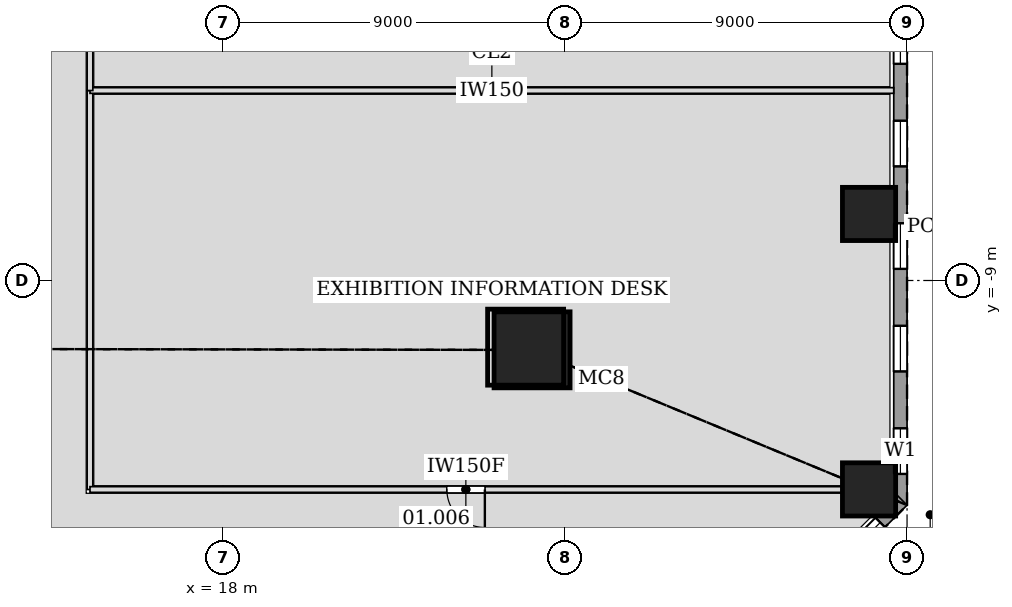
"""IFC4 building model, lengths in metres.
Left out: names, types, materials, properties, quantities, classifications, styles, units other than length and angle.
Written with IfcOpenShell. Run it as: python <this file> out.ifc"""

import sys

from ifc_helpers import new_model, si_unit, direction, frame, frame_2d, origin, origin_2d, place, context, subcontext, project, spatial, rectangle, hollow_rectangle, extrude, element, fill, save


model = new_model("IFC4")
c1 = context("Model", 3, precision=1e-05, world=origin(), true_north=direction((0.0, 1.0)))
c2 = subcontext(c1, "Body", "Model", "MODEL_VIEW")
j1 = project(units=[si_unit("LENGTHUNIT", "METRE"), si_unit("PLANEANGLEUNIT", "RADIAN")], contexts=[c1])
p1 = place(None, origin())
s1 = spatial("IfcSite", under=j1, at=p1, CompositionType="ELEMENT")
p2 = place(p1, origin())
s2 = spatial("IfcBuilding", under=s1, at=p2, CompositionType="ELEMENT")
p3 = place(p2, frame((0.0, 0.0, 7.2)))
s3 = spatial("IfcBuildingStorey", under=s2, at=p3, CompositionType="ELEMENT", Elevation=7.2)
p4 = place(p3, frame((26.133, -10.824, 0.0), z_axis=(-0.028266381762, 0.011713263234, 0.999531795956), x_axis=(-0.38282136346, -0.923822387517, 0.0)))
e1 = element("IfcColumn", 1, at=p4, inside=s3, PredefinedType="COLUMN", context=c2, shape_type="SweptSolid", body=[
    extrude(hollow_rectangle(XDim=2.0, YDim=2.0, WallThickness=0.09, at=origin_2d()), origin(), (0.0, 0.0, 1.0), 6.003),
])
for number, where, z_axis, x_axis in (
    (2, (35.0, -14.498, 0.0), (0.0, 0.0, 1.0), (1.0, 0.0, 0.0)),
    (3, (35.0, -7.249, 0.0), (0.0, 0.0, 1.0), (1.0, 0.0, 0.0)),
):
    element("IfcColumn", number, at=place(p3, frame(where, z_axis=z_axis, x_axis=x_axis)), inside=s3, PredefinedType="COLUMN", context=c2, shape_type="SweptSolid", body=[
        extrude(rectangle(XDim=1.4, YDim=1.4, at=origin_2d()), origin(), (0.0, 0.0, 1.0), 6.0),
    ])
p5 = place(p3, frame((35.825, -14.912, 0.0), z_axis=(0.0, 0.0, 1.0), x_axis=(0.0, 1.0, 0.0)))
e4 = element("IfcWall", 4, at=p5, inside=s3, PredefinedType="SOLIDWALL", context=c2, shape_type="SweptSolid", body=[
    extrude(rectangle(XDim=29.823, YDim=0.35, at=frame_2d((14.912, 0.0))), origin(), (0.0, 0.0, 1.0), 5.7),
])
p6 = place(p5, frame((0.822, 0.0, 0.9)))
e5 = element("IfcOpeningElement", 5, at=p6, cuts=e4, PredefinedType="OPENING", context=c2, shape_type="SweptSolid", body=[
    extrude(rectangle(XDim=1.2, YDim=4.2, at=frame_2d((0.6, 2.1))), frame((0.0, 0.185, 0.0), z_axis=(0.0, -1.0, 0.0), x_axis=(1.0, 0.0, 0.0)), (0.0, 0.0, 1.0), 0.37),
])
p7 = place(p5, frame((3.52, 0.0, 0.9)))
e6 = element("IfcOpeningElement", 6, at=p7, cuts=e4, PredefinedType="OPENING", context=c2, shape_type="SweptSolid", body=[
    extrude(rectangle(XDim=1.2, YDim=4.2, at=frame_2d((0.6, 2.1))), frame((0.0, 0.185, 0.0), z_axis=(0.0, -1.0, 0.0), x_axis=(1.0, 0.0, 0.0)), (0.0, 0.0, 1.0), 0.37),
])
p8 = place(p5, frame((6.218, 0.0, 0.9)))
e7 = element("IfcOpeningElement", 7, at=p8, cuts=e4, PredefinedType="OPENING", context=c2, shape_type="SweptSolid", body=[
    extrude(rectangle(XDim=1.2, YDim=4.2, at=frame_2d((0.6, 2.1))), frame((0.0, 0.185, 0.0), z_axis=(0.0, -1.0, 0.0), x_axis=(1.0, 0.0, 0.0)), (0.0, 0.0, 1.0), 0.37),
])
p9 = place(p5, frame((8.916, 0.0, 0.9)))
e8 = element("IfcOpeningElement", 8, at=p9, cuts=e4, PredefinedType="OPENING", context=c2, shape_type="SweptSolid", body=[
    extrude(rectangle(XDim=1.2, YDim=4.2, at=frame_2d((0.6, 2.1))), frame((0.0, 0.185, 0.0), z_axis=(0.0, -1.0, 0.0), x_axis=(1.0, 0.0, 0.0)), (0.0, 0.0, 1.0), 0.37),
])
p10 = place(p5, frame((11.614, 0.0, 0.9)))
e9 = element("IfcOpeningElement", 9, at=p10, cuts=e4, PredefinedType="OPENING", context=c2, shape_type="SweptSolid", body=[
    extrude(rectangle(XDim=1.2, YDim=4.2, at=frame_2d((0.6, 2.1))), frame((0.0, 0.185, 0.0), z_axis=(0.0, -1.0, 0.0), x_axis=(1.0, 0.0, 0.0)), (0.0, 0.0, 1.0), 0.37),
])
p11 = place(p5, frame((14.312, 0.0, 0.9)))
e10 = element("IfcOpeningElement", 10, at=p11, cuts=e4, PredefinedType="OPENING", context=c2, shape_type="SweptSolid", body=[
    extrude(rectangle(XDim=1.2, YDim=4.2, at=frame_2d((0.6, 2.1))), frame((0.0, 0.185, 0.0), z_axis=(0.0, -1.0, 0.0), x_axis=(1.0, 0.0, 0.0)), (0.0, 0.0, 1.0), 0.37),
])
p12 = place(p5, frame((17.01, 0.0, 0.9)))
e11 = element("IfcOpeningElement", 11, at=p12, cuts=e4, PredefinedType="OPENING", context=c2, shape_type="SweptSolid", body=[
    extrude(rectangle(XDim=1.2, YDim=4.2, at=frame_2d((0.6, 2.1))), frame((0.0, 0.185, 0.0), z_axis=(0.0, -1.0, 0.0), x_axis=(1.0, 0.0, 0.0)), (0.0, 0.0, 1.0), 0.37),
])
p13 = place(p5, frame((19.708, 0.0, 0.9)))
e12 = element("IfcOpeningElement", 12, at=p13, cuts=e4, PredefinedType="OPENING", context=c2, shape_type="SweptSolid", body=[
    extrude(rectangle(XDim=1.2, YDim=4.2, at=frame_2d((0.6, 2.1))), frame((0.0, 0.185, 0.0), z_axis=(0.0, -1.0, 0.0), x_axis=(1.0, 0.0, 0.0)), (0.0, 0.0, 1.0), 0.37),
])
p14 = place(p5, frame((22.406, 0.0, 0.9)))
e13 = element("IfcOpeningElement", 13, at=p14, cuts=e4, PredefinedType="OPENING", context=c2, shape_type="SweptSolid", body=[
    extrude(rectangle(XDim=1.2, YDim=4.2, at=frame_2d((0.6, 2.1))), frame((0.0, 0.185, 0.0), z_axis=(0.0, -1.0, 0.0), x_axis=(1.0, 0.0, 0.0)), (0.0, 0.0, 1.0), 0.37),
])
p15 = place(p5, frame((25.104, 0.0, 0.9)))
e14 = element("IfcOpeningElement", 14, at=p15, cuts=e4, PredefinedType="OPENING", context=c2, shape_type="SweptSolid", body=[
    extrude(rectangle(XDim=1.2, YDim=4.2, at=frame_2d((0.6, 2.1))), frame((0.0, 0.185, 0.0), z_axis=(0.0, -1.0, 0.0), x_axis=(1.0, 0.0, 0.0)), (0.0, 0.0, 1.0), 0.37),
])
p16 = place(p5, frame((27.802, 0.0, 0.9)))
e15 = element("IfcOpeningElement", 15, at=p16, cuts=e4, PredefinedType="OPENING", context=c2, shape_type="SweptSolid", body=[
    extrude(rectangle(XDim=1.2, YDim=4.2, at=frame_2d((0.6, 2.1))), frame((0.0, 0.185, 0.0), z_axis=(0.0, -1.0, 0.0), x_axis=(1.0, 0.0, 0.0)), (0.0, 0.0, 1.0), 0.37),
])
p17 = place(p3, frame((14.788, -35.876, 0.0), z_axis=(0.0, 0.0, 1.0), x_axis=(0.707106781187, 0.707106781187, 0.0)))
e16 = element("IfcWall", 16, at=p17, inside=s3, PredefinedType="SOLIDWALL", context=c2, shape_type="SweptSolid", body=[
    extrude(rectangle(XDim=29.823, YDim=0.35, at=frame_2d((14.912, 0.0))), origin(), (0.0, 0.0, 1.0), 5.7),
])
p18 = place(p17, frame((0.822, 0.0, 0.9)))
e17 = element("IfcOpeningElement", 17, at=p18, cuts=e16, PredefinedType="OPENING", context=c2, shape_type="SweptSolid", body=[
    extrude(rectangle(XDim=1.2, YDim=4.2, at=frame_2d((0.6, 2.1))), frame((0.0, 0.185, 0.0), z_axis=(0.0, -1.0, 0.0), x_axis=(1.0, 0.0, 0.0)), (0.0, 0.0, 1.0), 0.37),
])
p19 = place(p17, frame((3.52, 0.0, 0.9)))
e18 = element("IfcOpeningElement", 18, at=p19, cuts=e16, PredefinedType="OPENING", context=c2, shape_type="SweptSolid", body=[
    extrude(rectangle(XDim=1.2, YDim=4.2, at=frame_2d((0.6, 2.1))), frame((0.0, 0.185, 0.0), z_axis=(0.0, -1.0, 0.0), x_axis=(1.0, 0.0, 0.0)), (0.0, 0.0, 1.0), 0.37),
])
p20 = place(p17, frame((6.218, 0.0, 0.9)))
e19 = element("IfcOpeningElement", 19, at=p20, cuts=e16, PredefinedType="OPENING", context=c2, shape_type="SweptSolid", body=[
    extrude(rectangle(XDim=1.2, YDim=4.2, at=frame_2d((0.6, 2.1))), frame((0.0, 0.185, 0.0), z_axis=(0.0, -1.0, 0.0), x_axis=(1.0, 0.0, 0.0)), (0.0, 0.0, 1.0), 0.37),
])
p21 = place(p17, frame((8.916, 0.0, 0.9)))
e20 = element("IfcOpeningElement", 20, at=p21, cuts=e16, PredefinedType="OPENING", context=c2, shape_type="SweptSolid", body=[
    extrude(rectangle(XDim=1.2, YDim=4.2, at=frame_2d((0.6, 2.1))), frame((0.0, 0.185, 0.0), z_axis=(0.0, -1.0, 0.0), x_axis=(1.0, 0.0, 0.0)), (0.0, 0.0, 1.0), 0.37),
])
p22 = place(p17, frame((11.614, 0.0, 0.9)))
e21 = element("IfcOpeningElement", 21, at=p22, cuts=e16, PredefinedType="OPENING", context=c2, shape_type="SweptSolid", body=[
    extrude(rectangle(XDim=1.2, YDim=4.2, at=frame_2d((0.6, 2.1))), frame((0.0, 0.185, 0.0), z_axis=(0.0, -1.0, 0.0), x_axis=(1.0, 0.0, 0.0)), (0.0, 0.0, 1.0), 0.37),
])
p23 = place(p17, frame((14.312, 0.0, 0.9)))
e22 = element("IfcOpeningElement", 22, at=p23, cuts=e16, PredefinedType="OPENING", context=c2, shape_type="SweptSolid", body=[
    extrude(rectangle(XDim=1.2, YDim=4.2, at=frame_2d((0.6, 2.1))), frame((0.0, 0.185, 0.0), z_axis=(0.0, -1.0, 0.0), x_axis=(1.0, 0.0, 0.0)), (0.0, 0.0, 1.0), 0.37),
])
p24 = place(p17, frame((17.01, 0.0, 0.9)))
e23 = element("IfcOpeningElement", 23, at=p24, cuts=e16, PredefinedType="OPENING", context=c2, shape_type="SweptSolid", body=[
    extrude(rectangle(XDim=1.2, YDim=4.2, at=frame_2d((0.6, 2.1))), frame((0.0, 0.185, 0.0), z_axis=(0.0, -1.0, 0.0), x_axis=(1.0, 0.0, 0.0)), (0.0, 0.0, 1.0), 0.37),
])
p25 = place(p17, frame((19.708, 0.0, 0.9)))
e24 = element("IfcOpeningElement", 24, at=p25, cuts=e16, PredefinedType="OPENING", context=c2, shape_type="SweptSolid", body=[
    extrude(rectangle(XDim=1.2, YDim=4.2, at=frame_2d((0.6, 2.1))), frame((0.0, 0.185, 0.0), z_axis=(0.0, -1.0, 0.0), x_axis=(1.0, 0.0, 0.0)), (0.0, 0.0, 1.0), 0.37),
])
p26 = place(p17, frame((22.406, 0.0, 0.9)))
e25 = element("IfcOpeningElement", 25, at=p26, cuts=e16, PredefinedType="OPENING", context=c2, shape_type="SweptSolid", body=[
    extrude(rectangle(XDim=1.2, YDim=4.2, at=frame_2d((0.6, 2.1))), frame((0.0, 0.185, 0.0), z_axis=(0.0, -1.0, 0.0), x_axis=(1.0, 0.0, 0.0)), (0.0, 0.0, 1.0), 0.37),
])
p27 = place(p17, frame((25.104, 0.0, 0.9)))
e26 = element("IfcOpeningElement", 26, at=p27, cuts=e16, PredefinedType="OPENING", context=c2, shape_type="SweptSolid", body=[
    extrude(rectangle(XDim=1.2, YDim=4.2, at=frame_2d((0.6, 2.1))), frame((0.0, 0.185, 0.0), z_axis=(0.0, -1.0, 0.0), x_axis=(1.0, 0.0, 0.0)), (0.0, 0.0, 1.0), 0.37),
])
p28 = place(p17, frame((27.802, 0.0, 0.9)))
e27 = element("IfcOpeningElement", 27, at=p28, cuts=e16, PredefinedType="OPENING", context=c2, shape_type="SweptSolid", body=[
    extrude(rectangle(XDim=1.2, YDim=4.2, at=frame_2d((0.6, 2.1))), frame((0.0, 0.185, 0.0), z_axis=(0.0, -1.0, 0.0), x_axis=(1.0, 0.0, 0.0)), (0.0, 0.0, 1.0), 0.37),
])
p29 = place(p3, frame((14.5, -4.0, 0.0), z_axis=(0.0, 0.0, 1.0), x_axis=(0.0, -1.0, 0.0)))
e28 = element("IfcWall", 28, at=p29, inside=s3, PredefinedType="PARTITIONING", context=c2, shape_type="SweptSolid", body=[
    extrude(rectangle(XDim=10.5, YDim=0.15, at=frame_2d((5.25, 0.0))), origin(), (0.0, 0.0, 1.0), 4.39),
])
p30 = place(p3, frame((14.5, -14.5, 0.0), z_axis=(0.0, 0.0, 1.0), x_axis=(1.0, 0.0, 0.0)))
e29 = element("IfcWall", 29, at=p30, inside=s3, PredefinedType="PARTITIONING", context=c2, shape_type="SweptSolid", body=[
    extrude(rectangle(XDim=19.781, YDim=0.15, at=frame_2d((9.891, 0.0))), origin(), (0.0, 0.0, 1.0), 4.59),
])
p31 = place(p30, frame((9.39, 0.0, 0.0)))
e30 = element("IfcOpeningElement", 30, at=p31, cuts=e29, PredefinedType="OPENING", context=c2, shape_type="SweptSolid", body=[
    extrude(rectangle(XDim=1.0, YDim=2.1, at=frame_2d((0.5, 1.05))), frame((0.0, 0.085, 0.0), z_axis=(0.0, -1.0, 0.0), x_axis=(1.0, 0.0, 0.0)), (0.0, 0.0, 1.0), 0.17),
])
p32 = place(p3, frame((35.65, -4.0, 0.0), z_axis=(0.0, 0.0, 1.0), x_axis=(-1.0, 0.0, 0.0)))
e31 = element("IfcWall", 31, at=p32, inside=s3, PredefinedType="PARTITIONING", context=c2, shape_type="SweptSolid", body=[
    extrude(rectangle(XDim=21.15, YDim=0.15, at=frame_2d((10.575, 0.0))), origin(), (0.0, 0.0, 1.0), 4.679),
])
p33 = place(p3, frame((14.5, -4.001, 0.0), z_axis=(0.0, 0.0, 1.0), x_axis=(0.0, 1.0, 0.0)))
e32 = element("IfcWall", 32, at=p33, inside=s3, PredefinedType="PARTITIONING", context=c2, shape_type="SweptSolid", body=[
    extrude(rectangle(XDim=18.501, YDim=0.15, at=frame_2d((9.25, 0.0))), origin(), (0.0, 0.0, 1.0), 4.39),
])
p34 = place(p6, origin())
e33 = element("IfcWindow", 33, at=p34, inside=s3, PartitioningType="SINGLE_PANEL", PredefinedType="WINDOW", context=c2, shape_type="SweptSolid", body=[
    extrude(rectangle(XDim=1.2, YDim=4.2, at=frame_2d((0.6, 2.1))), frame((0.0, 0.03, 0.0), z_axis=(0.0, -1.0, 0.0), x_axis=(1.0, 0.0, 0.0)), (0.0, 0.0, 1.0), 0.06),
])
fill(e5, e33)
p35 = place(p7, origin())
e34 = element("IfcWindow", 34, at=p35, inside=s3, PartitioningType="SINGLE_PANEL", PredefinedType="WINDOW", context=c2, shape_type="SweptSolid", body=[
    extrude(rectangle(XDim=1.2, YDim=4.2, at=frame_2d((0.6, 2.1))), frame((0.0, 0.03, 0.0), z_axis=(0.0, -1.0, 0.0), x_axis=(1.0, 0.0, 0.0)), (0.0, 0.0, 1.0), 0.06),
])
fill(e6, e34)
p36 = place(p8, origin())
e35 = element("IfcWindow", 35, at=p36, inside=s3, PartitioningType="SINGLE_PANEL", PredefinedType="WINDOW", context=c2, shape_type="SweptSolid", body=[
    extrude(rectangle(XDim=1.2, YDim=4.2, at=frame_2d((0.6, 2.1))), frame((0.0, 0.03, 0.0), z_axis=(0.0, -1.0, 0.0), x_axis=(1.0, 0.0, 0.0)), (0.0, 0.0, 1.0), 0.06),
])
fill(e7, e35)
p37 = place(p9, origin())
e36 = element("IfcWindow", 36, at=p37, inside=s3, PartitioningType="SINGLE_PANEL", PredefinedType="WINDOW", context=c2, shape_type="SweptSolid", body=[
    extrude(rectangle(XDim=1.2, YDim=4.2, at=frame_2d((0.6, 2.1))), frame((0.0, 0.03, 0.0), z_axis=(0.0, -1.0, 0.0), x_axis=(1.0, 0.0, 0.0)), (0.0, 0.0, 1.0), 0.06),
])
fill(e8, e36)
p38 = place(p10, origin())
e37 = element("IfcWindow", 37, at=p38, inside=s3, PartitioningType="SINGLE_PANEL", PredefinedType="WINDOW", context=c2, shape_type="SweptSolid", body=[
    extrude(rectangle(XDim=1.2, YDim=4.2, at=frame_2d((0.6, 2.1))), frame((0.0, 0.03, 0.0), z_axis=(0.0, -1.0, 0.0), x_axis=(1.0, 0.0, 0.0)), (0.0, 0.0, 1.0), 0.06),
])
fill(e9, e37)
p39 = place(p28, origin())
e38 = element("IfcWindow", 38, at=p39, inside=s3, PartitioningType="SINGLE_PANEL", PredefinedType="WINDOW", context=c2, shape_type="SweptSolid", body=[
    extrude(rectangle(XDim=1.2, YDim=4.2, at=frame_2d((0.6, 2.1))), frame((0.0, 0.03, 0.0), z_axis=(0.0, -1.0, 0.0), x_axis=(1.0, 0.0, 0.0)), (0.0, 0.0, 1.0), 0.06),
])
fill(e27, e38)
p40 = place(p31, frame((1.0, 0.0, 0.0), z_axis=(0.0, 0.0, 1.0), x_axis=(-1.0, 0.0, 0.0)))
e39 = element("IfcDoor", 39, at=p40, inside=s3, OperationType="SINGLE_SWING_LEFT", PredefinedType="DOOR", context=c2, shape_type="SweptSolid", body=[
    extrude(rectangle(XDim=1.0, YDim=2.1, at=frame_2d((0.5, 1.05))), frame((0.0, 0.025, 0.0), z_axis=(0.0, -1.0, 0.0), x_axis=(1.0, 0.0, 0.0)), (0.0, 0.0, 1.0), 0.05),
])
fill(e30, e39)
save(model, sys.argv[1])
